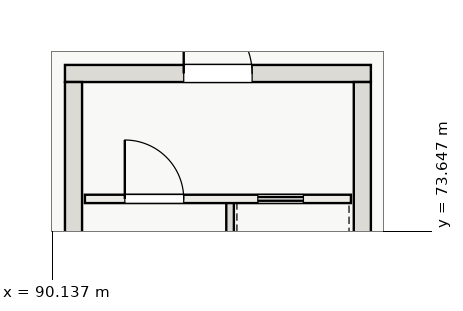
"""IFC4 building model, lengths in metres.
Left out: names, types, materials, properties, quantities, classifications, styles, units other than length and angle.
Written with IfcOpenShell. Run it as: python <this file> out.ifc"""

import sys

from ifc_helpers import new_model, si_unit, direction, frame, frame_2d, origin, place, context, subcontext, project, spatial, rectangle, extrude, element, fill, save


model = new_model("IFC4")
c1 = context("Model", 3, precision=1e-05, world=origin(), true_north=direction((0.0, 1.0)))
c2 = subcontext(c1, "Body", "Model", "MODEL_VIEW")
j1 = project(units=[si_unit("LENGTHUNIT", "METRE"), si_unit("PLANEANGLEUNIT", "RADIAN")], contexts=[c1])
p1 = place(None, origin())
s1 = spatial("IfcSite", under=j1, at=p1, CompositionType="ELEMENT")
p2 = place(p1, origin())
s2 = spatial("IfcBuilding", under=s1, at=p2, CompositionType="ELEMENT")
p3 = place(p2, origin())
s3 = spatial("IfcBuildingStorey", under=s2, at=p3, CompositionType="ELEMENT", Elevation=0.0)
p4 = place(p3, frame((90.475, 77.8, 0.0), z_axis=(0.0, 0.0, 1.0), x_axis=(1.0, 0.0, 0.0)))
e1 = element("IfcWall", 1, at=p4, inside=s3, PredefinedType="SHEAR", context=c2, shape_type="SweptSolid", body=[
    extrude(rectangle(XDim=8.05, YDim=0.45, at=frame_2d((4.025, 0.0))), origin(), (0.0, 0.0, 1.0), 6.0),
])
p5 = place(p4, frame((3.125, 0.0, 0.0)))
e2 = element("IfcOpeningElement", 2, at=p5, cuts=e1, PredefinedType="OPENING", context=c2, shape_type="SweptSolid", body=[
    extrude(rectangle(XDim=1.8, YDim=2.3, at=frame_2d((0.9, 1.15))), frame((0.0, 0.235, 0.0), z_axis=(0.0, -1.0, 0.0), x_axis=(1.0, 0.0, 0.0)), (0.0, 0.0, 1.0), 0.47),
])
for number, where, z_axis, x_axis in (
    (3, (90.7, 66.425, 0.0), (0.0, 0.0, 1.0), (0.0, 1.0, 0.0)),
    (4, (98.3, 66.425, 0.0), (0.0, 0.0, 1.0), (0.0, 1.0, 0.0)),
):
    element("IfcWall", number, at=place(p3, frame(where, z_axis=z_axis, x_axis=x_axis)), inside=s3, PredefinedType="SHEAR", context=c2, shape_type="SweptSolid", body=[
        extrude(rectangle(XDim=11.15, YDim=0.45, at=frame_2d((5.575, 0.0))), origin(), (0.0, 0.0, 1.0), 6.0),
    ])
p6 = place(p3, frame((94.82, 66.45, 0.0), z_axis=(0.0, 0.0, 1.0), x_axis=(0.0, 1.0, 0.0)))
e5 = element("IfcWall", 5, at=p6, inside=s3, PredefinedType="SOLIDWALL", context=c2, shape_type="SweptSolid", body=[
    extrude(rectangle(XDim=8.0, YDim=0.2, at=frame_2d((4.0, 0.0))), origin(), (0.0, 0.0, 1.0), 6.0),
])
p7 = place(p3, frame((91.0, 74.5, 0.0), z_axis=(0.0, 0.0, 1.0), x_axis=(1.0, 0.0, 0.0)))
e6 = element("IfcWall", 6, at=p7, inside=s3, PredefinedType="SOLIDWALL", context=c2, shape_type="SweptSolid", body=[
    extrude(rectangle(XDim=7.0, YDim=0.22, at=frame_2d((3.5, 0.0))), origin(), (0.0, 0.0, 1.0), 5.68),
])
p8 = place(p7, frame((1.05, 0.0, 0.0)))
e7 = element("IfcOpeningElement", 7, at=p8, cuts=e6, PredefinedType="OPENING", context=c2, shape_type="SweptSolid", body=[
    extrude(rectangle(XDim=1.55, YDim=2.2, at=frame_2d((0.775, 1.1))), frame((0.0, 0.12, 0.0), z_axis=(0.0, -1.0, 0.0), x_axis=(1.0, 0.0, 0.0)), (0.0, 0.0, 1.0), 0.24),
])
p9 = place(p7, frame((4.55, 0.0, 0.0)))
e8 = element("IfcOpeningElement", 8, at=p9, cuts=e6, PredefinedType="OPENING", context=c2, shape_type="SweptSolid", body=[
    extrude(rectangle(XDim=1.2, YDim=2.2, at=frame_2d((0.6, 1.1))), frame((0.0, 0.12, 0.0), z_axis=(0.0, -1.0, 0.0), x_axis=(1.0, 0.0, 0.0)), (0.0, 0.0, 1.0), 0.24),
])
p10 = place(p8, origin())
e9 = element("IfcDoor", 9, at=p10, inside=s3, OperationType="SINGLE_SWING_LEFT", PredefinedType="DOOR", context=c2, shape_type="SweptSolid", body=[
    extrude(rectangle(XDim=1.55, YDim=2.2, at=frame_2d((0.775, 1.1))), frame((0.0, 0.025, 0.0), z_axis=(0.0, -1.0, 0.0), x_axis=(1.0, 0.0, 0.0)), (0.0, 0.0, 1.0), 0.05),
])
fill(e7, e9)
p11 = place(p9, origin())
e10 = element("IfcDoor", 10, at=p11, inside=s3, OperationType="SLIDING_TO_LEFT", PredefinedType="DOOR", context=c2, shape_type="SweptSolid", body=[
    extrude(rectangle(XDim=1.2, YDim=2.2, at=frame_2d((0.6, 1.1))), frame((0.0, 0.025, 0.0), z_axis=(0.0, -1.0, 0.0), x_axis=(1.0, 0.0, 0.0)), (0.0, 0.0, 1.0), 0.05),
])
fill(e8, e10)
p12 = place(p5, origin())
e11 = element("IfcDoor", 11, at=p12, inside=s3, OperationType="DOUBLE_DOOR_SINGLE_SWING", PredefinedType="DOOR", context=c2, shape_type="SweptSolid", body=[
    extrude(rectangle(XDim=1.8, YDim=2.3, at=frame_2d((0.9, 1.15))), frame((0.0, 0.025, 0.0), z_axis=(0.0, -1.0, 0.0), x_axis=(1.0, 0.0, 0.0)), (0.0, 0.0, 1.0), 0.05),
])
fill(e2, e11)
save(model, sys.argv[1])
